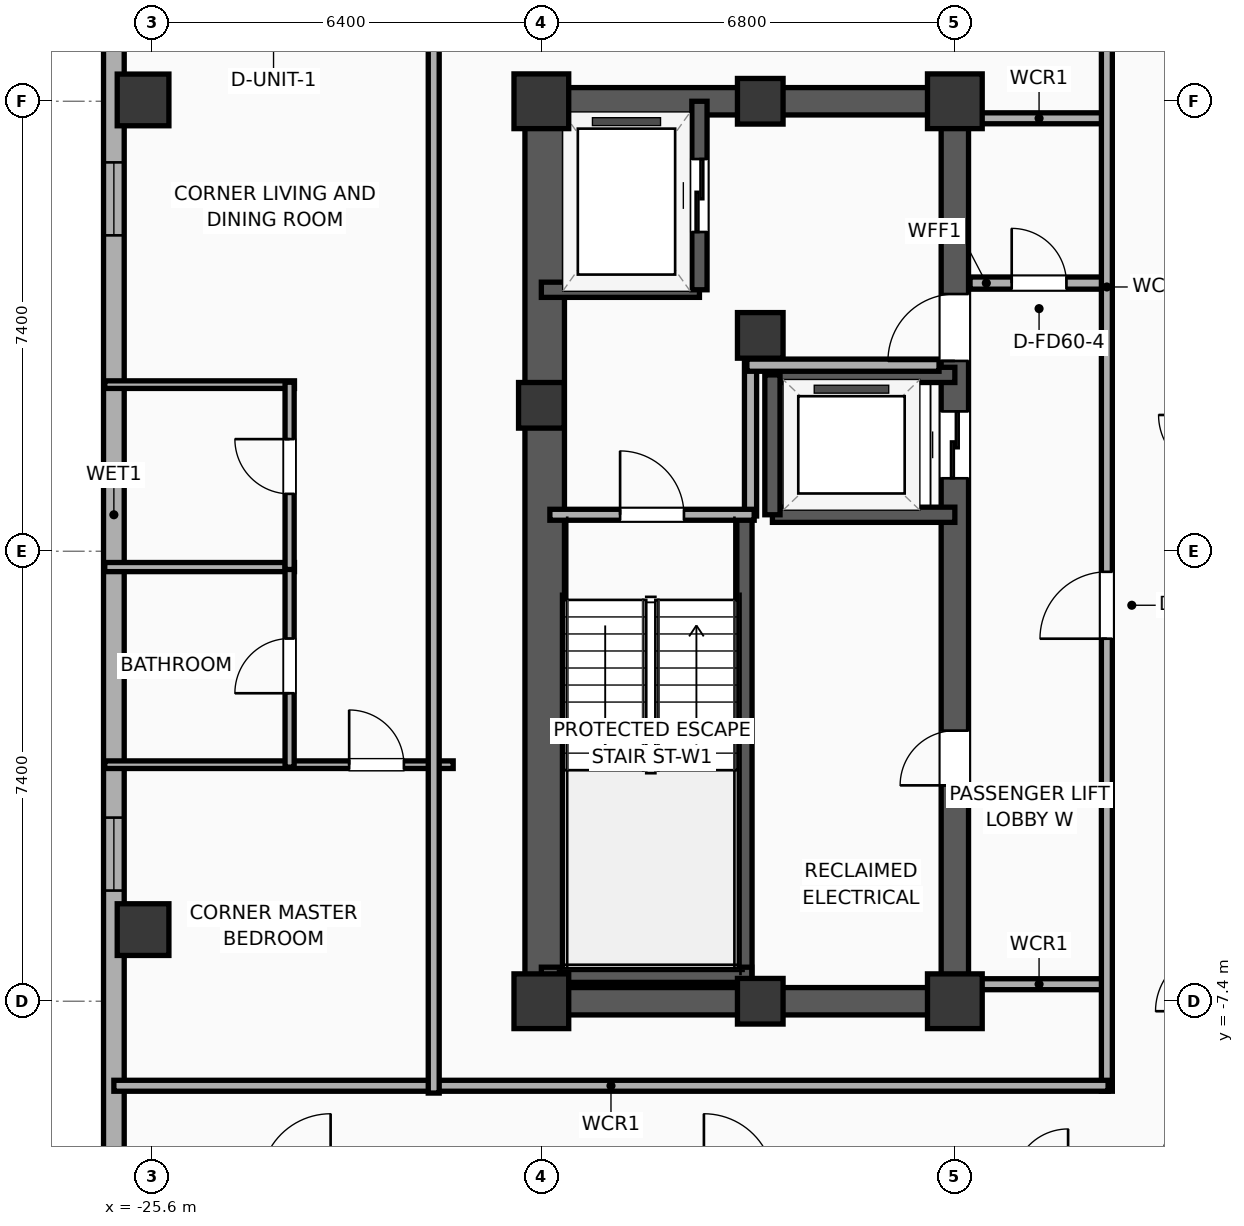
"""IFC4 building model, lengths in metres.
Left out: names, types, materials, properties, quantities, classifications, styles, units other than length and angle.
Written with IfcOpenShell. Run it as: python <this file> out.ifc"""

import sys

from ifc_helpers import new_model, si_unit, direction, frame, frame_2d, origin, origin_2d, place, context, subcontext, project, spatial, rectangle, hollow_rectangle, extrude, element, fill, save


model = new_model("IFC4")
c1 = context("Model", 3, precision=1e-05, world=origin(), true_north=direction((0.0, 1.0)))
c2 = subcontext(c1, "Body", "Model", "MODEL_VIEW")
j1 = project(units=[si_unit("LENGTHUNIT", "METRE"), si_unit("PLANEANGLEUNIT", "RADIAN")], contexts=[c1])
p1 = place(None, origin())
s1 = spatial("IfcSite", under=j1, at=p1, CompositionType="ELEMENT")
p2 = place(p1, origin())
s2 = spatial("IfcBuilding", under=s1, at=p2, CompositionType="ELEMENT")
p3 = place(p2, frame((0.0, 0.0, 208.0)))
s3 = spatial("IfcBuildingStorey", under=s2, at=p3, CompositionType="ELEMENT", Elevation=208.0)
p4 = place(p3, frame((-19.2, -7.4, 0.0), z_axis=(0.0, 0.0, 1.0), x_axis=(1.0, 0.0, 0.0)))
e1 = element("IfcColumn", 1, at=p4, inside=s3, PredefinedType="COLUMN", context=c2, shape_type="SweptSolid", body=[
    extrude(rectangle(XDim=0.9, YDim=0.9, at=origin_2d()), origin(), (0.0, 0.0, 1.0), 3.9),
])
p5 = place(p3, frame((-19.2, 2.4, 0.0), z_axis=(0.0, 0.0, 1.0), x_axis=(1.0, 0.0, 0.0)))
e2 = element("IfcColumn", 2, at=p5, inside=s3, PredefinedType="COLUMN", context=c2, shape_type="SweptSolid", body=[
    extrude(rectangle(XDim=0.75, YDim=0.75, at=origin_2d()), origin(), (0.0, 0.0, 1.0), 3.9),
])
p6 = place(p3, frame((-19.2, 7.4, 0.0), z_axis=(0.0, 0.0, 1.0), x_axis=(1.0, 0.0, 0.0)))
e3 = element("IfcColumn", 3, at=p6, inside=s3, PredefinedType="COLUMN", context=c2, shape_type="SweptSolid", body=[
    extrude(rectangle(XDim=0.9, YDim=0.9, at=origin_2d()), origin(), (0.0, 0.0, 1.0), 3.9),
])
for number, where, z_axis, x_axis in (
    (4, (-15.6, -7.4, 0.0), (0.0, 0.0, 1.0), (1.0, 0.0, 0.0)),
    (5, (-15.6, 7.4, 0.0), (0.0, 0.0, 1.0), (1.0, 0.0, 0.0)),
):
    element("IfcColumn", number, at=place(p3, frame(where, z_axis=z_axis, x_axis=x_axis)), inside=s3, PredefinedType="COLUMN", context=c2, shape_type="SweptSolid", body=[
        extrude(rectangle(XDim=0.75, YDim=0.75, at=origin_2d()), origin(), (0.0, 0.0, 1.0), 3.9),
    ])
p7 = place(p3, frame((-12.4, -7.4, 0.0), z_axis=(0.0, 0.0, 1.0), x_axis=(1.0, 0.0, 0.0)))
e6 = element("IfcColumn", 6, at=p7, inside=s3, PredefinedType="COLUMN", context=c2, shape_type="SweptSolid", body=[
    extrude(rectangle(XDim=0.9, YDim=0.9, at=origin_2d()), origin(), (0.0, 0.0, 1.0), 3.9),
])
p8 = place(p3, frame((-15.6, 3.55, 0.0), z_axis=(0.0, 0.0, 1.0), x_axis=(1.0, 0.0, 0.0)))
e7 = element("IfcColumn", 7, at=p8, inside=s3, PredefinedType="COLUMN", context=c2, shape_type="SweptSolid", body=[
    extrude(rectangle(XDim=0.75, YDim=0.75, at=origin_2d()), origin(), (0.0, 0.0, 1.0), 3.9),
])
p9 = place(p3, frame((-12.4, 7.4, 0.0), z_axis=(0.0, 0.0, 1.0), x_axis=(1.0, 0.0, 0.0)))
e8 = element("IfcColumn", 8, at=p9, inside=s3, PredefinedType="COLUMN", context=c2, shape_type="SweptSolid", body=[
    extrude(rectangle(XDim=0.9, YDim=0.9, at=origin_2d()), origin(), (0.0, 0.0, 1.0), 3.9),
])
for number, where, z_axis, x_axis in (
    (9, (-19.425, -7.4, 0.0), (0.0, 0.0, 1.0), (1.0, 0.0, 0.0)),
    (10, (-19.425, 7.4, 0.0), (0.0, 0.0, 1.0), (1.0, 0.0, 0.0)),
):
    element("IfcWall", number, at=place(p3, frame(where, z_axis=z_axis, x_axis=x_axis)), inside=s3, PredefinedType="SHEAR", context=c2, shape_type="SweptSolid", body=[
        extrude(rectangle(XDim=7.25, YDim=0.45, at=frame_2d((3.625, 0.0))), origin(), (0.0, 0.0, 1.0), 3.65),
    ])
p10 = place(p3, frame((-19.145, -7.4, 0.0), z_axis=(0.0, 0.0, 1.0), x_axis=(0.0, 1.0, 0.0)))
e11 = element("IfcWall", 11, at=p10, inside=s3, PredefinedType="SHEAR", context=c2, shape_type="SweptSolid", body=[
    extrude(rectangle(XDim=14.8, YDim=0.65, at=frame_2d((7.4, 0.0))), origin(), (0.0, 0.0, 1.0), 3.65),
])
p11 = place(p3, frame((-12.4, -7.4, 0.0), z_axis=(0.0, 0.0, 1.0), x_axis=(0.0, 1.0, 0.0)))
e12 = element("IfcWall", 12, at=p11, inside=s3, PredefinedType="SHEAR", context=c2, shape_type="SweptSolid", body=[
    extrude(rectangle(XDim=14.8, YDim=0.45, at=frame_2d((7.4, 0.0))), origin(), (0.0, 0.0, 1.0), 3.65),
])
p12 = place(p11, frame((8.6, 0.0, 0.0)))
e13 = element("IfcOpeningElement", 13, at=p12, cuts=e12, PredefinedType="OPENING", context=c2, shape_type="SweptSolid", body=[
    extrude(rectangle(XDim=1.1, YDim=2.05, at=frame_2d((0.55, 1.025))), frame((0.0, 0.235, 0.0), z_axis=(0.0, -1.0, 0.0), x_axis=(1.0, 0.0, 0.0)), (0.0, 0.0, 1.0), 0.47),
])
p13 = place(p11, frame((10.53, 0.0, 0.0)))
e14 = element("IfcOpeningElement", 14, at=p13, cuts=e12, PredefinedType="OPENING", context=c2, shape_type="SweptSolid", body=[
    extrude(rectangle(XDim=1.1, YDim=2.05, at=frame_2d((0.55, 1.025))), frame((0.0, 0.235, 0.0), z_axis=(0.0, -1.0, 0.0), x_axis=(1.0, 0.0, 0.0)), (0.0, 0.0, 1.0), 0.47),
])
p14 = place(p11, frame((3.55, 0.0, 0.0)))
e15 = element("IfcOpeningElement", 15, at=p14, cuts=e12, PredefinedType="OPENING", context=c2, shape_type="SweptSolid", body=[
    extrude(rectangle(XDim=0.9, YDim=2.05, at=frame_2d((0.45, 1.025))), frame((0.0, 0.235, 0.0), z_axis=(0.0, -1.0, 0.0), x_axis=(1.0, 0.0, 0.0)), (0.0, 0.0, 1.0), 0.47),
])
p15 = place(p3, frame((-15.86, -7.085, 0.0), z_axis=(0.0, 0.0, 1.0), x_axis=(0.0, 1.0, 0.0)))
e16 = element("IfcWall", 16, at=p15, inside=s3, PredefinedType="SOLIDWALL", context=c2, shape_type="SweptSolid", body=[
    extrude(rectangle(XDim=7.685, YDim=0.25, at=frame_2d((3.843, 0.0))), origin(), (0.0, 0.0, 1.0), 3.65),
])
p16 = place(p3, frame((-19.2, -6.965, 0.0), z_axis=(0.0, 0.0, 1.0), x_axis=(1.0, 0.0, 0.0)))
e17 = element("IfcWall", 17, at=p16, inside=s3, PredefinedType="SOLIDWALL", context=c2, shape_type="SweptSolid", body=[
    extrude(rectangle(XDim=3.46, YDim=0.25, at=frame_2d((1.73, 0.0))), origin(), (0.0, 0.0, 1.0), 3.65),
])
for number, where, z_axis, x_axis in (
    (18, (-25.75, 7.422, 0.0), (0.0, 0.0, 1.0), (1.0, 0.0, 0.0)),
    (19, (-25.75, -6.222, 0.0), (0.0, 0.0, 1.0), (1.0, 0.0, 0.0)),
):
    element("IfcColumn", number, at=place(p3, frame(where, z_axis=z_axis, x_axis=x_axis)), inside=s3, PredefinedType="COLUMN", context=c2, shape_type="SweptSolid", body=[
        extrude(hollow_rectangle(XDim=0.85, YDim=0.85, WallThickness=0.028, at=origin_2d()), origin(), (0.0, 0.0, 1.0), 3.9),
    ])
p17 = place(p3, frame((-26.23, -15.383, 0.0), z_axis=(0.0, 0.0, 1.0), x_axis=(0.0, 1.0, 0.0)))
e20 = element("IfcWall", 20, at=p17, inside=s3, PredefinedType="ELEMENTEDWALL", context=c2, shape_type="SweptSolid", body=[
    extrude(rectangle(XDim=31.967, YDim=0.34, at=frame_2d((15.983, 0.0))), origin(), (0.0, 0.0, 1.0), 3.65),
])
p18 = place(p17, frame((29.415, 0.0, 0.75)))
e21 = element("IfcOpeningElement", 21, at=p18, cuts=e20, PredefinedType="OPENING", context=c2, shape_type="SweptSolid", body=[
    extrude(rectangle(XDim=1.2, YDim=2.05, at=frame_2d((0.6, 1.025))), frame((0.0, 0.18, 0.0), z_axis=(0.0, -1.0, 0.0), x_axis=(1.0, 0.0, 0.0)), (0.0, 0.0, 1.0), 0.36),
])
p19 = place(p17, frame((20.578, 0.0, 0.75)))
e22 = element("IfcOpeningElement", 22, at=p19, cuts=e20, PredefinedType="OPENING", context=c2, shape_type="SweptSolid", body=[
    extrude(rectangle(XDim=1.2, YDim=2.05, at=frame_2d((0.6, 1.025))), frame((0.0, 0.18, 0.0), z_axis=(0.0, -1.0, 0.0), x_axis=(1.0, 0.0, 0.0)), (0.0, 0.0, 1.0), 0.36),
])
p20 = place(p17, frame((9.803, 0.0, 0.75)))
e23 = element("IfcOpeningElement", 23, at=p20, cuts=e20, PredefinedType="OPENING", context=c2, shape_type="SweptSolid", body=[
    extrude(rectangle(XDim=1.2, YDim=2.05, at=frame_2d((0.6, 1.025))), frame((0.0, 0.18, 0.0), z_axis=(0.0, -1.0, 0.0), x_axis=(1.0, 0.0, 0.0)), (0.0, 0.0, 1.0), 0.36),
])
p21 = place(p3, frame((-19.2, 4.3, 0.0), z_axis=(0.0, 0.0, 1.0), x_axis=(1.0, 0.0, 0.0)))
e24 = element("IfcWall", 24, at=p21, inside=s3, PredefinedType="SOLIDWALL", context=c2, shape_type="SweptSolid", body=[
    extrude(rectangle(XDim=2.6, YDim=0.25, at=frame_2d((1.3, 0.0))), origin(), (0.0, 0.0, 1.0), 3.65),
])
p22 = place(p3, frame((-16.6, 4.3, 0.0), z_axis=(0.0, 0.0, 1.0), x_axis=(0.0, 1.0, 0.0)))
e25 = element("IfcWall", 25, at=p22, inside=s3, PredefinedType="SOLIDWALL", context=c2, shape_type="SweptSolid", body=[
    extrude(rectangle(XDim=3.1, YDim=0.25, at=frame_2d((1.55, 0.0))), origin(), (0.0, 0.0, 1.0), 3.65),
])
p23 = place(p22, frame((0.95, 0.0, 0.0)))
e26 = element("IfcOpeningElement", 26, at=p23, cuts=e25, PredefinedType="OPENING", context=c2, shape_type="SweptSolid", body=[
    extrude(rectangle(XDim=1.2, YDim=2.05, at=frame_2d((0.6, 1.025))), frame((0.0, 0.135, 0.0), z_axis=(0.0, -1.0, 0.0), x_axis=(1.0, 0.0, 0.0)), (0.0, 0.0, 1.0), 0.27),
])
for number, where, z_axis, x_axis in (
    (27, (-15.4, 0.6, 0.0), (0.0, 0.0, 1.0), (1.0, 0.0, 0.0)),
    (28, (-12.4, 2.9, 0.0), (0.0, 0.0, 1.0), (-1.0, 0.0, 0.0)),
):
    element("IfcWall", number, at=place(p3, frame(where, z_axis=z_axis, x_axis=x_axis)), inside=s3, PredefinedType="SOLIDWALL", context=c2, shape_type="SweptSolid", body=[
        extrude(rectangle(XDim=3.0, YDim=0.25, at=frame_2d((1.5, 0.0))), origin(), (0.0, 0.0, 1.0), 3.65),
    ])
p24 = place(p3, frame((-15.4, 2.9, 0.0), z_axis=(0.0, 0.0, 1.0), x_axis=(0.0, -1.0, 0.0)))
e29 = element("IfcWall", 29, at=p24, inside=s3, PredefinedType="SOLIDWALL", context=c2, shape_type="SweptSolid", body=[
    extrude(rectangle(XDim=2.3, YDim=0.25, at=frame_2d((1.15, 0.0))), origin(), (0.0, 0.0, 1.0), 3.65),
])
p25 = place(p3, frame((-15.76, 0.58, 0.0), z_axis=(0.0, 0.0, 1.0), x_axis=(0.0, 1.0, 0.0)))
e30 = element("IfcWall", 30, at=p25, inside=s3, PredefinedType="PARTITIONING", context=c2, shape_type="SweptSolid", body=[
    extrude(rectangle(XDim=2.52, YDim=0.2, at=frame_2d((1.26, 0.0))), origin(), (0.0, 0.0, 1.0), 3.65),
])
p26 = place(p3, frame((-15.82, 3.06, 0.0), z_axis=(0.0, 0.0, 1.0), x_axis=(1.0, 0.0, 0.0)))
e31 = element("IfcWall", 31, at=p26, inside=s3, PredefinedType="PARTITIONING", context=c2, shape_type="SweptSolid", body=[
    extrude(rectangle(XDim=3.16, YDim=0.2, at=frame_2d((1.58, 0.0))), origin(), (0.0, 0.0, 1.0), 3.65),
])
p27 = place(p3, frame((-19.06, 0.6, 0.0), z_axis=(0.0, 0.0, 1.0), x_axis=(1.0, 0.0, 0.0)))
e32 = element("IfcWall", 32, at=p27, inside=s3, PredefinedType="PARTITIONING", context=c2, shape_type="SweptSolid", body=[
    extrude(rectangle(XDim=3.36, YDim=0.18, at=frame_2d((1.68, 0.0))), origin(), (0.0, 0.0, 1.0), 3.65),
])
p28 = place(p27, frame((1.155, 0.0, 0.0)))
e33 = element("IfcOpeningElement", 33, at=p28, cuts=e32, PredefinedType="OPENING", context=c2, shape_type="SweptSolid", body=[
    extrude(rectangle(XDim=1.05, YDim=2.05, at=frame_2d((0.525, 1.025))), frame((0.0, 0.1, 0.0), z_axis=(0.0, -1.0, 0.0), x_axis=(1.0, 0.0, 0.0)), (0.0, 0.0, 1.0), 0.2),
])
p29 = place(p3, frame((-12.15, 4.41, 0.0), z_axis=(0.0, 0.0, 1.0), x_axis=(1.0, 0.0, 0.0)))
e34 = element("IfcWall", 34, at=p29, inside=s3, PredefinedType="PARTITIONING", context=c2, shape_type="SweptSolid", body=[
    extrude(rectangle(XDim=2.27, YDim=0.2, at=frame_2d((1.135, 0.0))), origin(), (0.0, 0.0, 1.0), 3.65),
])
p30 = place(p29, frame((0.685, 0.0, 0.0)))
e35 = element("IfcOpeningElement", 35, at=p30, cuts=e34, PredefinedType="OPENING", context=c2, shape_type="SweptSolid", body=[
    extrude(rectangle(XDim=0.9, YDim=2.05, at=frame_2d((0.45, 1.025))), frame((0.0, 0.11, 0.0), z_axis=(0.0, -1.0, 0.0), x_axis=(1.0, 0.0, 0.0)), (0.0, 0.0, 1.0), 0.22),
])
for number, where, z_axis, x_axis in (
    (36, (-12.15, 7.12, 0.0), (0.0, 0.0, 1.0), (1.0, 0.0, 0.0)),
    (37, (-12.15, -7.12, 0.0), (0.0, 0.0, 1.0), (1.0, 0.0, 0.0)),
):
    element("IfcWall", number, at=place(p3, frame(where, z_axis=z_axis, x_axis=x_axis)), inside=s3, PredefinedType="PARTITIONING", context=c2, shape_type="SweptSolid", body=[
        extrude(rectangle(XDim=2.27, YDim=0.18, at=frame_2d((1.135, 0.0))), origin(), (0.0, 0.0, 1.0), 3.65),
    ])
p31 = place(p3, frame((-9.9, -8.88, 0.0), z_axis=(0.0, 0.0, 1.0), x_axis=(0.0, 1.0, 0.0)))
e38 = element("IfcWall", 38, at=p31, inside=s3, PredefinedType="PARTITIONING", context=c2, shape_type="SweptSolid", body=[
    extrude(rectangle(XDim=17.76, YDim=0.18, at=frame_2d((8.88, 0.0))), origin(), (0.0, 0.0, 1.0), 3.65),
])
p32 = place(p31, frame((7.442, 0.0, 0.0)))
e39 = element("IfcOpeningElement", 39, at=p32, cuts=e38, PredefinedType="OPENING", context=c2, shape_type="SweptSolid", body=[
    extrude(rectangle(XDim=1.1, YDim=2.05, at=frame_2d((0.55, 1.025))), frame((0.0, 0.1, 0.0), z_axis=(0.0, -1.0, 0.0), x_axis=(1.0, 0.0, 0.0)), (0.0, 0.0, 1.0), 0.2),
])
p33 = place(p3, frame((-26.23, -8.79, 0.0), z_axis=(0.0, 0.0, 1.0), x_axis=(1.0, 0.0, 0.0)))
e40 = element("IfcWall", 40, at=p33, inside=s3, PredefinedType="PARTITIONING", context=c2, shape_type="SweptSolid", body=[
    extrude(rectangle(XDim=16.35, YDim=0.18, at=frame_2d((8.175, 0.0))), origin(), (0.0, 0.0, 1.0), 3.65),
])
p34 = place(p3, frame((-26.38, 2.74, 0.0), z_axis=(0.0, 0.0, 1.0), x_axis=(1.0, 0.0, 0.0)))
e41 = element("IfcWall", 41, at=p34, inside=s3, PredefinedType="PARTITIONING", context=c2, shape_type="SweptSolid", body=[
    extrude(rectangle(XDim=3.12, YDim=0.125, at=frame_2d((1.56, 0.0))), origin(), (0.0, 0.0, 1.0), 3.65),
])
p35 = place(p3, frame((-26.38, -0.26, 0.0), z_axis=(0.0, 0.0, 1.0), x_axis=(1.0, 0.0, 0.0)))
e42 = element("IfcWall", 42, at=p35, inside=s3, PredefinedType="PLUMBINGWALL", context=c2, shape_type="SweptSolid", body=[
    extrude(rectangle(XDim=3.12, YDim=0.15, at=frame_2d((1.56, 0.0))), origin(), (0.0, 0.0, 1.0), 3.65),
])
p36 = place(p3, frame((-26.38, -3.51, 0.0), z_axis=(0.0, 0.0, 1.0), x_axis=(1.0, 0.0, 0.0)))
e43 = element("IfcWall", 43, at=p36, inside=s3, PredefinedType="PARTITIONING", context=c2, shape_type="SweptSolid", body=[
    extrude(rectangle(XDim=5.73, YDim=0.125, at=frame_2d((2.865, 0.0))), origin(), (0.0, 0.0, 1.0), 3.65),
])
p37 = place(p36, frame((4.019, 0.0, 0.0)))
e44 = element("IfcOpeningElement", 44, at=p37, cuts=e43, PredefinedType="OPENING", context=c2, shape_type="SweptSolid", body=[
    extrude(rectangle(XDim=0.9, YDim=2.05, at=frame_2d((0.45, 1.025))), frame((0.0, 0.073, 0.0), z_axis=(0.0, -1.0, 0.0), x_axis=(1.0, 0.0, 0.0)), (0.0, 0.0, 1.0), 0.145),
])
p38 = place(p3, frame((-23.34, -3.55, 0.0), z_axis=(0.0, 0.0, 1.0), x_axis=(0.0, 1.0, 0.0)))
e45 = element("IfcWall", 45, at=p38, inside=s3, PredefinedType="PLUMBINGWALL", context=c2, shape_type="SweptSolid", body=[
    extrude(rectangle(XDim=3.33, YDim=0.15, at=frame_2d((1.665, 0.0))), origin(), (0.0, 0.0, 1.0), 3.65),
])
p39 = place(p38, frame((1.215, 0.0, 0.0)))
e46 = element("IfcOpeningElement", 46, at=p39, cuts=e45, PredefinedType="OPENING", context=c2, shape_type="SweptSolid", body=[
    extrude(rectangle(XDim=0.9, YDim=2.05, at=frame_2d((0.45, 1.025))), frame((0.0, 0.085, 0.0), z_axis=(0.0, -1.0, 0.0), x_axis=(1.0, 0.0, 0.0)), (0.0, 0.0, 1.0), 0.17),
])
p40 = place(p3, frame((-23.34, -0.3, 0.0), z_axis=(0.0, 0.0, 1.0), x_axis=(0.0, 1.0, 0.0)))
e47 = element("IfcWall", 47, at=p40, inside=s3, PredefinedType="PLUMBINGWALL", context=c2, shape_type="SweptSolid", body=[
    extrude(rectangle(XDim=3.08, YDim=0.15, at=frame_2d((1.54, 0.0))), origin(), (0.0, 0.0, 1.0), 3.65),
])
p41 = place(p40, frame((1.244, 0.0, 0.0)))
e48 = element("IfcOpeningElement", 48, at=p41, cuts=e47, PredefinedType="OPENING", context=c2, shape_type="SweptSolid", body=[
    extrude(rectangle(XDim=0.9, YDim=2.05, at=frame_2d((0.45, 1.025))), frame((0.0, 0.085, 0.0), z_axis=(0.0, -1.0, 0.0), x_axis=(1.0, 0.0, 0.0)), (0.0, 0.0, 1.0), 0.17),
])
p42 = place(p3, frame((-20.97, -8.91, 0.0), z_axis=(0.0, 0.0, 1.0), x_axis=(0.0, 1.0, 0.0)))
e49 = element("IfcWall", 49, at=p42, inside=s3, PredefinedType="PARTITIONING", context=c2, shape_type="SweptSolid", body=[
    extrude(rectangle(XDim=17.82, YDim=0.18, at=frame_2d((8.91, 0.0))), origin(), (0.0, 0.0, 1.0), 3.65),
])
p43 = place(p19, origin())
e50 = element("IfcWindow", 50, at=p43, inside=s3, PartitioningType="SINGLE_PANEL", PredefinedType="WINDOW", context=c2, shape_type="SweptSolid", body=[
    extrude(rectangle(XDim=1.2, YDim=2.05, at=frame_2d((0.6, 1.025))), frame((0.0, 0.03, 0.0), z_axis=(0.0, -1.0, 0.0), x_axis=(1.0, 0.0, 0.0)), (0.0, 0.0, 1.0), 0.06),
])
fill(e22, e50)
p44 = place(p20, origin())
e51 = element("IfcWindow", 51, at=p44, inside=s3, PartitioningType="SINGLE_PANEL", PredefinedType="WINDOW", context=c2, shape_type="SweptSolid", body=[
    extrude(rectangle(XDim=1.2, YDim=2.05, at=frame_2d((0.6, 1.025))), frame((0.0, 0.03, 0.0), z_axis=(0.0, -1.0, 0.0), x_axis=(1.0, 0.0, 0.0)), (0.0, 0.0, 1.0), 0.06),
])
fill(e23, e51)
p45 = place(p23, origin())
e52 = element("IfcDoor", 52, at=p45, inside=s3, OperationType="SLIDING_TO_LEFT", PredefinedType="DOOR", context=c2, shape_type="SweptSolid", body=[
    extrude(rectangle(XDim=1.2, YDim=2.05, at=frame_2d((0.6, 1.025))), frame((0.0, 0.025, 0.0), z_axis=(0.0, -1.0, 0.0), x_axis=(1.0, 0.0, 0.0)), (0.0, 0.0, 1.0), 0.05),
])
fill(e26, e52)
p46 = place(p12, origin())
e53 = element("IfcDoor", 53, at=p46, inside=s3, OperationType="SLIDING_TO_LEFT", PredefinedType="DOOR", context=c2, shape_type="SweptSolid", body=[
    extrude(rectangle(XDim=1.1, YDim=2.05, at=frame_2d((0.55, 1.025))), frame((0.0, 0.025, 0.0), z_axis=(0.0, -1.0, 0.0), x_axis=(1.0, 0.0, 0.0)), (0.0, 0.0, 1.0), 0.05),
])
fill(e13, e53)
p47 = place(p28, origin())
e54 = element("IfcDoor", 54, at=p47, inside=s3, OperationType="SINGLE_SWING_LEFT", PredefinedType="DOOR", context=c2, shape_type="SweptSolid", body=[
    extrude(rectangle(XDim=1.05, YDim=2.05, at=frame_2d((0.525, 1.025))), frame((0.0, 0.025, 0.0), z_axis=(0.0, -1.0, 0.0), x_axis=(1.0, 0.0, 0.0)), (0.0, 0.0, 1.0), 0.05),
])
fill(e33, e54)
p48 = place(p30, origin())
e55 = element("IfcDoor", 55, at=p48, inside=s3, OperationType="SINGLE_SWING_LEFT", PredefinedType="DOOR", context=c2, shape_type="SweptSolid", body=[
    extrude(rectangle(XDim=0.9, YDim=2.05, at=frame_2d((0.45, 1.025))), frame((0.0, 0.025, 0.0), z_axis=(0.0, -1.0, 0.0), x_axis=(1.0, 0.0, 0.0)), (0.0, 0.0, 1.0), 0.05),
])
fill(e35, e55)
p49 = place(p32, origin())
e56 = element("IfcDoor", 56, at=p49, inside=s3, OperationType="SINGLE_SWING_LEFT", PredefinedType="DOOR", context=c2, shape_type="SweptSolid", body=[
    extrude(rectangle(XDim=1.1, YDim=2.05, at=frame_2d((0.55, 1.025))), frame((0.0, 0.025, 0.0), z_axis=(0.0, -1.0, 0.0), x_axis=(1.0, 0.0, 0.0)), (0.0, 0.0, 1.0), 0.05),
])
fill(e39, e56)
p50 = place(p37, origin())
e57 = element("IfcDoor", 57, at=p50, inside=s3, OperationType="SINGLE_SWING_LEFT", PredefinedType="DOOR", context=c2, shape_type="SweptSolid", body=[
    extrude(rectangle(XDim=0.9, YDim=2.05, at=frame_2d((0.45, 1.025))), frame((0.0, 0.025, 0.0), z_axis=(0.0, -1.0, 0.0), x_axis=(1.0, 0.0, 0.0)), (0.0, 0.0, 1.0), 0.05),
])
fill(e44, e57)
p51 = place(p39, origin())
e58 = element("IfcDoor", 58, at=p51, inside=s3, OperationType="SINGLE_SWING_LEFT", PredefinedType="DOOR", context=c2, shape_type="SweptSolid", body=[
    extrude(rectangle(XDim=0.9, YDim=2.05, at=frame_2d((0.45, 1.025))), frame((0.0, 0.025, 0.0), z_axis=(0.0, -1.0, 0.0), x_axis=(1.0, 0.0, 0.0)), (0.0, 0.0, 1.0), 0.05),
])
fill(e46, e58)
p52 = place(p41, origin())
e59 = element("IfcDoor", 59, at=p52, inside=s3, OperationType="SINGLE_SWING_RIGHT", PredefinedType="DOOR", context=c2, shape_type="SweptSolid", body=[
    extrude(rectangle(XDim=0.9, YDim=2.05, at=frame_2d((0.45, 1.025))), frame((0.0, 0.025, 0.0), z_axis=(0.0, -1.0, 0.0), x_axis=(1.0, 0.0, 0.0)), (0.0, 0.0, 1.0), 0.05),
])
fill(e48, e59)
p53 = place(p13, origin())
e60 = element("IfcDoor", 60, at=p53, inside=s3, OperationType="SINGLE_SWING_LEFT", PredefinedType="DOOR", context=c2, shape_type="SweptSolid", body=[
    extrude(rectangle(XDim=1.1, YDim=2.05, at=frame_2d((0.55, 1.025))), frame((0.0, 0.025, 0.0), z_axis=(0.0, -1.0, 0.0), x_axis=(1.0, 0.0, 0.0)), (0.0, 0.0, 1.0), 0.05),
])
fill(e14, e60)
p54 = place(p14, origin())
e61 = element("IfcDoor", 61, at=p54, inside=s3, OperationType="SINGLE_SWING_LEFT", PredefinedType="DOOR", context=c2, shape_type="SweptSolid", body=[
    extrude(rectangle(XDim=0.9, YDim=2.05, at=frame_2d((0.45, 1.025))), frame((0.0, 0.025, 0.0), z_axis=(0.0, -1.0, 0.0), x_axis=(1.0, 0.0, 0.0)), (0.0, 0.0, 1.0), 0.05),
])
fill(e15, e61)
save(model, sys.argv[1])
